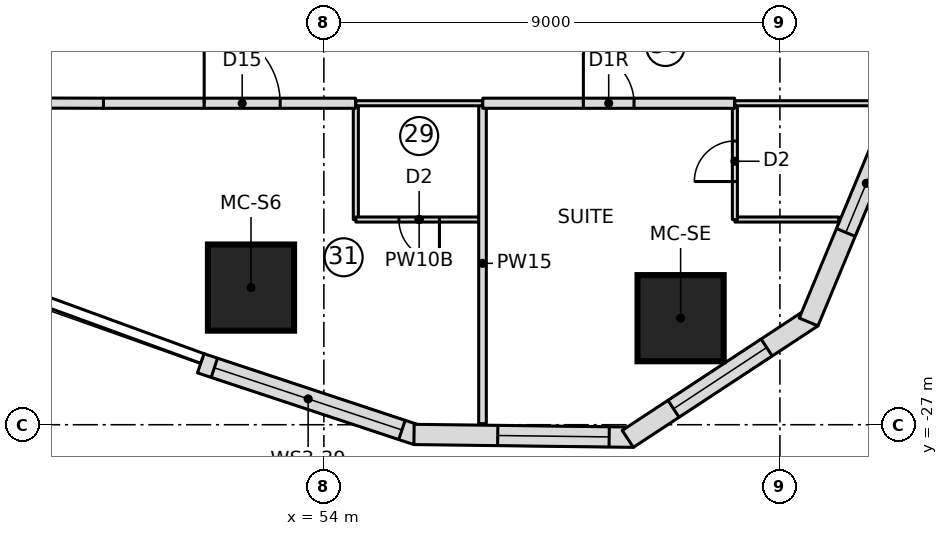
"""IFC4 building model, lengths in metres.
Left out: names, types, materials, properties, quantities, classifications, styles, units other than length and angle.
Written with IfcOpenShell. Run it as: python <this file> out.ifc"""

import sys

from ifc_helpers import new_model, si_unit, direction, frame, frame_2d, origin, origin_2d, place, context, subcontext, project, spatial, polyline, rectangle, outline, extrude, element, fill, save


model = new_model("IFC4")
c1 = context("Model", 3, precision=1e-05, world=origin(), true_north=direction((0.0, 1.0)))
c2 = subcontext(c1, "Body", "Model", "MODEL_VIEW")
j1 = project(units=[si_unit("LENGTHUNIT", "METRE"), si_unit("PLANEANGLEUNIT", "RADIAN")], contexts=[c1])
p1 = place(None, origin())
s1 = spatial("IfcSite", under=j1, at=p1, CompositionType="ELEMENT")
p2 = place(p1, origin())
s2 = spatial("IfcBuilding", under=s1, at=p2, CompositionType="ELEMENT")
p3 = place(p2, frame((0.0, 0.0, 109.75)))
s3 = spatial("IfcBuildingStorey", under=s2, at=p3, CompositionType="ELEMENT", Elevation=109.75)
for number, where, z_axis, x_axis in (
    (1, (52.562, -24.293, 0.0), (0.0, 0.0, 1.0), (1.0, 0.0, 0.0)),
    (2, (61.04, -24.897, 0.0), (0.0, 0.0, 1.0), (1.0, 0.0, 0.0)),
):
    element("IfcColumn", number, at=place(p3, frame(where, z_axis=z_axis, x_axis=x_axis)), inside=s3, PredefinedType="COLUMN", context=c2, shape_type="SweptSolid", body=[
        extrude(rectangle(XDim=1.7, YDim=1.7, at=origin_2d()), origin(), (0.0, 0.0, 1.0), 3.55),
    ])
p4 = place(p3, frame((51.569, -25.787, 0.0), z_axis=(0.0, 0.0, 1.0), x_axis=(0.94925004851, -0.314522408429, 0.0)))
e3 = element("IfcWall", 3, at=p4, inside=s3, PredefinedType="NOTDEFINED", context=c2, shape_type="SweptSolid", body=[
    extrude(outline(polyline([(0.0, -0.2), (4.499, -0.2), (4.437, 0.2), (0.0, 0.2), (0.0, -0.2)])), origin(), (0.0, 0.0, 1.0), 3.25),
])
p5 = place(p4, frame((0.284, 0.0, 0.9)))
e4 = element("IfcOpeningElement", 4, at=p5, cuts=e3, PredefinedType="OPENING", context=c2, shape_type="SweptSolid", body=[
    extrude(rectangle(XDim=3.9, YDim=1.8, at=frame_2d((1.95, 0.9))), frame((0.0, 0.21, 0.0), z_axis=(0.0, -1.0, 0.0), x_axis=(1.0, 0.0, 0.0)), (0.0, 0.0, 1.0), 0.42),
])
p6 = place(p3, frame((55.81, -27.192, 0.0), z_axis=(0.0, 0.0, 1.0), x_axis=(0.999919718849, -0.012671063772, 0.0)))
e5 = element("IfcWall", 5, at=p6, inside=s3, PredefinedType="NOTDEFINED", context=c2, shape_type="SweptSolid", body=[
    extrude(outline(polyline([(-0.031, -0.2), (4.3, -0.2), (4.177, 0.2), (0.031, 0.2), (-0.031, -0.2)])), origin(), (0.0, 0.0, 1.0), 3.25),
])
p7 = place(p6, frame((1.621, 0.0, 0.6)))
e6 = element("IfcOpeningElement", 6, at=p7, cuts=e5, PredefinedType="OPENING", context=c2, shape_type="SweptSolid", body=[
    extrude(outline(polyline([(0.0, 1.35), (0.084, 1.771), (0.322, 2.128), (0.679, 2.366), (1.1, 2.45), (1.521, 2.366), (1.878, 2.128), (2.116, 1.771), (2.2, 1.35), (2.2, 1.1), (2.116, 0.679), (1.878, 0.322), (1.521, 0.084), (1.1, 0.0), (0.679, 0.084), (0.322, 0.322), (0.084, 0.679), (0.0, 1.1), (0.0, 1.35)])), frame((0.0, 0.21, 0.0), z_axis=(0.0, -1.0, 0.0), x_axis=(1.0, 0.0, 0.0)), (0.0, 0.0, 1.0), 0.42),
])
p8 = place(p3, frame((60.049, -27.246, 0.0), z_axis=(0.0, 0.0, 1.0), x_axis=(0.835340523653, 0.549732852887, 0.0)))
e7 = element("IfcWall", 7, at=p8, inside=s3, PredefinedType="NOTDEFINED", context=c2, shape_type="SweptSolid", body=[
    extrude(outline(polyline([(-0.061, -0.2), (4.3, -0.2), (4.178, 0.2), (0.061, 0.2), (-0.061, -0.2)])), origin(), (0.0, 0.0, 1.0), 3.25),
])
p9 = place(p8, frame((1.02, 0.0, 0.6)))
e8 = element("IfcOpeningElement", 8, at=p9, cuts=e7, PredefinedType="OPENING", context=c2, shape_type="SweptSolid", body=[
    extrude(outline(polyline([(0.0, 1.35), (0.084, 1.771), (0.322, 2.128), (0.679, 2.366), (1.1, 2.45), (1.521, 2.366), (1.878, 2.128), (2.116, 1.771), (2.2, 1.35), (2.2, 1.1), (2.116, 0.679), (1.878, 0.322), (1.521, 0.084), (1.1, 0.0), (0.679, 0.084), (0.322, 0.322), (0.084, 0.679), (0.0, 1.1), (0.0, 1.35)])), frame((0.0, 0.21, 0.0), z_axis=(0.0, -1.0, 0.0), x_axis=(1.0, 0.0, 0.0)), (0.0, 0.0, 1.0), 0.42),
])
p10 = place(p3, frame((63.59, -24.916, 0.0), z_axis=(0.0, 0.0, 1.0), x_axis=(0.383997751971, 0.923334027577, 0.0)))
e9 = element("IfcWall", 9, at=p10, inside=s3, PredefinedType="NOTDEFINED", context=c2, shape_type="SweptSolid", body=[
    extrude(outline(polyline([(-0.061, -0.2), (4.27, -0.2), (4.208, 0.2), (0.061, 0.2), (-0.061, -0.2)])), origin(), (0.0, 0.0, 1.0), 3.25),
])
p11 = place(p10, frame((1.852, 0.0, 0.6)))
e10 = element("IfcOpeningElement", 10, at=p11, cuts=e9, PredefinedType="OPENING", context=c2, shape_type="SweptSolid", body=[
    extrude(outline(polyline([(0.0, 1.4), (0.08, 1.802), (0.308, 2.142), (0.648, 2.37), (1.05, 2.45), (1.452, 2.37), (1.792, 2.142), (2.02, 1.802), (2.1, 1.4), (2.1, 1.05), (2.02, 0.648), (1.792, 0.308), (1.452, 0.08), (1.05, 0.0), (0.648, 0.08), (0.308, 0.308), (0.08, 0.648), (0.0, 1.05), (0.0, 1.4)])), frame((0.0, 0.21, 0.0), z_axis=(0.0, -1.0, 0.0), x_axis=(1.0, 0.0, 0.0)), (0.0, 0.0, 1.0), 0.42),
])
p12 = place(p3, frame((54.631, -22.95, 0.0), z_axis=(0.0, 0.0, 1.0), x_axis=(0.0, 1.0, 0.0)))
e11 = element("IfcWall", 11, at=p12, inside=s3, PredefinedType="PARTITIONING", context=c2, shape_type="SweptSolid", body=[
    extrude(rectangle(XDim=2.3, YDim=0.1, at=frame_2d((1.15, 0.0))), origin(), (0.0, 0.0, 1.0), 3.25),
])
p13 = place(p3, frame((57.131, -22.95, 0.0), z_axis=(0.0, 0.0, 1.0), x_axis=(-1.0, 0.0, 0.0)))
e12 = element("IfcWall", 12, at=p13, inside=s3, PredefinedType="PARTITIONING", context=c2, shape_type="SweptSolid", body=[
    extrude(rectangle(XDim=2.5, YDim=0.1, at=frame_2d((1.25, 0.0))), origin(), (0.0, 0.0, 1.0), 3.25),
])
p14 = place(p13, frame((0.85, 0.0, 0.0)))
e13 = element("IfcOpeningElement", 13, at=p14, cuts=e12, PredefinedType="OPENING", context=c2, shape_type="SweptSolid", body=[
    extrude(rectangle(XDim=0.8, YDim=2.1, at=frame_2d((0.4, 1.05))), frame((0.0, 0.06, 0.0), z_axis=(0.0, -1.0, 0.0), x_axis=(1.0, 0.0, 0.0)), (0.0, 0.0, 1.0), 0.12),
])
p15 = place(p3, frame((64.16, -22.95, 0.0), z_axis=(0.0, 0.0, 1.0), x_axis=(-1.0, 0.0, 0.0)))
e14 = element("IfcWall", 14, at=p15, inside=s3, PredefinedType="PARTITIONING", context=c2, shape_type="SweptSolid", body=[
    extrude(rectangle(XDim=2.049, YDim=0.1, at=frame_2d((1.025, 0.0))), origin(), (0.0, 0.0, 1.0), 3.25),
])
p16 = place(p3, frame((62.111, -22.95, 0.0), z_axis=(0.0, 0.0, 1.0), x_axis=(0.0, 1.0, 0.0)))
e15 = element("IfcWall", 15, at=p16, inside=s3, PredefinedType="PARTITIONING", context=c2, shape_type="SweptSolid", body=[
    extrude(rectangle(XDim=2.3, YDim=0.1, at=frame_2d((1.15, 0.0))), origin(), (0.0, 0.0, 1.0), 3.25),
])
p17 = place(p16, frame((0.75, 0.0, 0.0)))
e16 = element("IfcOpeningElement", 16, at=p17, cuts=e15, PredefinedType="OPENING", context=c2, shape_type="SweptSolid", body=[
    extrude(rectangle(XDim=0.8, YDim=2.1, at=frame_2d((0.4, 1.05))), frame((0.0, 0.06, 0.0), z_axis=(0.0, -1.0, 0.0), x_axis=(1.0, 0.0, 0.0)), (0.0, 0.0, 1.0), 0.12),
])
p18 = place(p3, frame((57.131, -26.979, 0.0), z_axis=(0.0, 0.0, 1.0), x_axis=(0.0, 1.0, 0.0)))
e17 = element("IfcWall", 17, at=p18, inside=s3, PredefinedType="PARTITIONING", context=c2, shape_type="SweptSolid", body=[
    extrude(rectangle(XDim=6.329, YDim=0.15, at=frame_2d((3.165, 0.0))), origin(), (0.0, 0.0, 1.0), 3.25),
])
p19 = place(p3, frame((49.65, -20.655, 0.0), z_axis=(0.0, 0.0, 1.0), x_axis=(1.0, 0.0, 0.0)))
e18 = element("IfcWall", 18, at=p19, inside=s3, PredefinedType="PARTITIONING", context=c2, shape_type="SweptSolid", body=[
    extrude(rectangle(XDim=4.976, YDim=0.2, at=frame_2d((2.488, 0.0))), origin(), (0.0, 0.0, 1.0), 3.25),
])
p20 = place(p19, frame((1.988, 0.0, 0.0)))
e19 = element("IfcOpeningElement", 19, at=p20, cuts=e18, PredefinedType="OPENING", context=c2, shape_type="SweptSolid", body=[
    extrude(rectangle(XDim=1.5, YDim=2.1, at=frame_2d((0.75, 1.05))), frame((0.0, 0.11, 0.0), z_axis=(0.0, -1.0, 0.0), x_axis=(1.0, 0.0, 0.0)), (0.0, 0.0, 1.0), 0.22),
])
p21 = place(p3, frame((57.135, -20.655, 0.0), z_axis=(0.0, 0.0, 1.0), x_axis=(1.0, 0.0, 0.0)))
e20 = element("IfcWall", 20, at=p21, inside=s3, PredefinedType="PARTITIONING", context=c2, shape_type="SweptSolid", body=[
    extrude(rectangle(XDim=4.971, YDim=0.2, at=frame_2d((2.485, 0.0))), origin(), (0.0, 0.0, 1.0), 3.25),
])
p22 = place(p21, frame((1.985, 0.0, 0.0)))
e21 = element("IfcOpeningElement", 21, at=p22, cuts=e20, PredefinedType="OPENING", context=c2, shape_type="SweptSolid", body=[
    extrude(rectangle(XDim=1.0, YDim=2.1, at=frame_2d((0.5, 1.05))), frame((0.0, 0.11, 0.0), z_axis=(0.0, -1.0, 0.0), x_axis=(1.0, 0.0, 0.0)), (0.0, 0.0, 1.0), 0.22),
])
p23 = place(p3, frame((54.631, -20.655, 0.0), z_axis=(0.0, 0.0, 1.0), x_axis=(1.0, 0.0, 0.0)))
e22 = element("IfcWall", 22, at=p23, inside=s3, PredefinedType="PARTITIONING", context=c2, shape_type="SweptSolid", body=[
    extrude(rectangle(XDim=2.5, YDim=0.1, at=frame_2d((1.25, 0.0))), origin(), (0.0, 0.0, 1.0), 3.25),
])
p24 = place(p3, frame((62.111, -20.655, 0.0), z_axis=(0.0, 0.0, 1.0), x_axis=(1.0, 0.0, 0.0)))
e23 = element("IfcWall", 23, at=p24, inside=s3, PredefinedType="PARTITIONING", context=c2, shape_type="SweptSolid", body=[
    extrude(rectangle(XDim=2.906, YDim=0.1, at=frame_2d((1.453, 0.0))), origin(), (0.0, 0.0, 1.0), 3.25),
])
p25 = place(p3, frame((48.265, -20.651, 0.0), z_axis=(0.0, 0.0, 1.0), x_axis=(0.999996503144, -0.002644560569, 0.0)))
e24 = element("IfcWall", 24, at=p25, inside=s3, PredefinedType="PARTITIONING", context=c2, shape_type="SweptSolid", body=[
    extrude(rectangle(XDim=1.385, YDim=0.2, at=frame_2d((0.692, 0.0))), origin(), (0.0, 0.0, 1.0), 3.25),
])
p26 = place(p5, origin())
e25 = element("IfcWindow", 25, at=p26, inside=s3, PartitioningType="SINGLE_PANEL", PredefinedType="WINDOW", context=c2, shape_type="SweptSolid", body=[
    extrude(rectangle(XDim=3.9, YDim=1.8, at=frame_2d((1.95, 0.9))), frame((0.0, 0.17, 0.0), z_axis=(0.0, -1.0, 0.0), x_axis=(1.0, 0.0, 0.0)), (0.0, 0.0, 1.0), 0.06),
])
fill(e4, e25)
p27 = place(p7, origin())
e26 = element("IfcWindow", 26, at=p27, inside=s3, PartitioningType="SINGLE_PANEL", PredefinedType="WINDOW", context=c2, shape_type="SweptSolid", body=[
    extrude(outline(polyline([(0.0, 1.35), (0.084, 1.771), (0.322, 2.128), (0.679, 2.366), (1.1, 2.45), (1.521, 2.366), (1.878, 2.128), (2.116, 1.771), (2.2, 1.35), (2.2, 1.1), (2.116, 0.679), (1.878, 0.322), (1.521, 0.084), (1.1, 0.0), (0.679, 0.084), (0.322, 0.322), (0.084, 0.679), (0.0, 1.1), (0.0, 1.35)])), frame((0.0, 0.17, 0.0), z_axis=(0.0, -1.0, 0.0), x_axis=(1.0, 0.0, 0.0)), (0.0, 0.0, 1.0), 0.06),
])
fill(e6, e26)
p28 = place(p9, origin())
e27 = element("IfcWindow", 27, at=p28, inside=s3, PartitioningType="SINGLE_PANEL", PredefinedType="WINDOW", context=c2, shape_type="SweptSolid", body=[
    extrude(outline(polyline([(0.0, 1.35), (0.084, 1.771), (0.322, 2.128), (0.679, 2.366), (1.1, 2.45), (1.521, 2.366), (1.878, 2.128), (2.116, 1.771), (2.2, 1.35), (2.2, 1.1), (2.116, 0.679), (1.878, 0.322), (1.521, 0.084), (1.1, 0.0), (0.679, 0.084), (0.322, 0.322), (0.084, 0.679), (0.0, 1.1), (0.0, 1.35)])), frame((0.0, 0.17, 0.0), z_axis=(0.0, -1.0, 0.0), x_axis=(1.0, 0.0, 0.0)), (0.0, 0.0, 1.0), 0.06),
])
fill(e8, e27)
p29 = place(p11, origin())
e28 = element("IfcWindow", 28, at=p29, inside=s3, PartitioningType="SINGLE_PANEL", PredefinedType="WINDOW", context=c2, shape_type="SweptSolid", body=[
    extrude(outline(polyline([(0.0, 1.4), (0.08, 1.802), (0.308, 2.142), (0.648, 2.37), (1.05, 2.45), (1.452, 2.37), (1.792, 2.142), (2.02, 1.802), (2.1, 1.4), (2.1, 1.05), (2.02, 0.648), (1.792, 0.308), (1.452, 0.08), (1.05, 0.0), (0.648, 0.08), (0.308, 0.308), (0.08, 0.648), (0.0, 1.05), (0.0, 1.4)])), frame((0.0, 0.17, 0.0), z_axis=(0.0, -1.0, 0.0), x_axis=(1.0, 0.0, 0.0)), (0.0, 0.0, 1.0), 0.06),
])
fill(e10, e28)
p30 = place(p14, origin())
e29 = element("IfcDoor", 29, at=p30, inside=s3, OperationType="SINGLE_SWING_LEFT", PredefinedType="DOOR", context=c2, shape_type="SweptSolid", body=[
    extrude(rectangle(XDim=0.8, YDim=2.1, at=frame_2d((0.4, 1.05))), frame((0.0, 0.025, 0.0), z_axis=(0.0, -1.0, 0.0), x_axis=(1.0, 0.0, 0.0)), (0.0, 0.0, 1.0), 0.05),
])
fill(e13, e29)
p31 = place(p17, origin())
e30 = element("IfcDoor", 30, at=p31, inside=s3, OperationType="SINGLE_SWING_LEFT", PredefinedType="DOOR", context=c2, shape_type="SweptSolid", body=[
    extrude(rectangle(XDim=0.8, YDim=2.1, at=frame_2d((0.4, 1.05))), frame((0.0, 0.025, 0.0), z_axis=(0.0, -1.0, 0.0), x_axis=(1.0, 0.0, 0.0)), (0.0, 0.0, 1.0), 0.05),
])
fill(e16, e30)
p32 = place(p20, origin())
e31 = element("IfcDoor", 31, at=p32, inside=s3, OperationType="DOUBLE_DOOR_SINGLE_SWING", PredefinedType="DOOR", context=c2, shape_type="SweptSolid", body=[
    extrude(rectangle(XDim=1.5, YDim=2.1, at=frame_2d((0.75, 1.05))), frame((0.0, 0.025, 0.0), z_axis=(0.0, -1.0, 0.0), x_axis=(1.0, 0.0, 0.0)), (0.0, 0.0, 1.0), 0.05),
])
fill(e19, e31)
p33 = place(p22, origin())
e32 = element("IfcDoor", 32, at=p33, inside=s3, OperationType="SINGLE_SWING_RIGHT", PredefinedType="DOOR", context=c2, shape_type="SweptSolid", body=[
    extrude(rectangle(XDim=1.0, YDim=2.1, at=frame_2d((0.5, 1.05))), frame((0.0, 0.025, 0.0), z_axis=(0.0, -1.0, 0.0), x_axis=(1.0, 0.0, 0.0)), (0.0, 0.0, 1.0), 0.05),
])
fill(e21, e32)
save(model, sys.argv[1])
